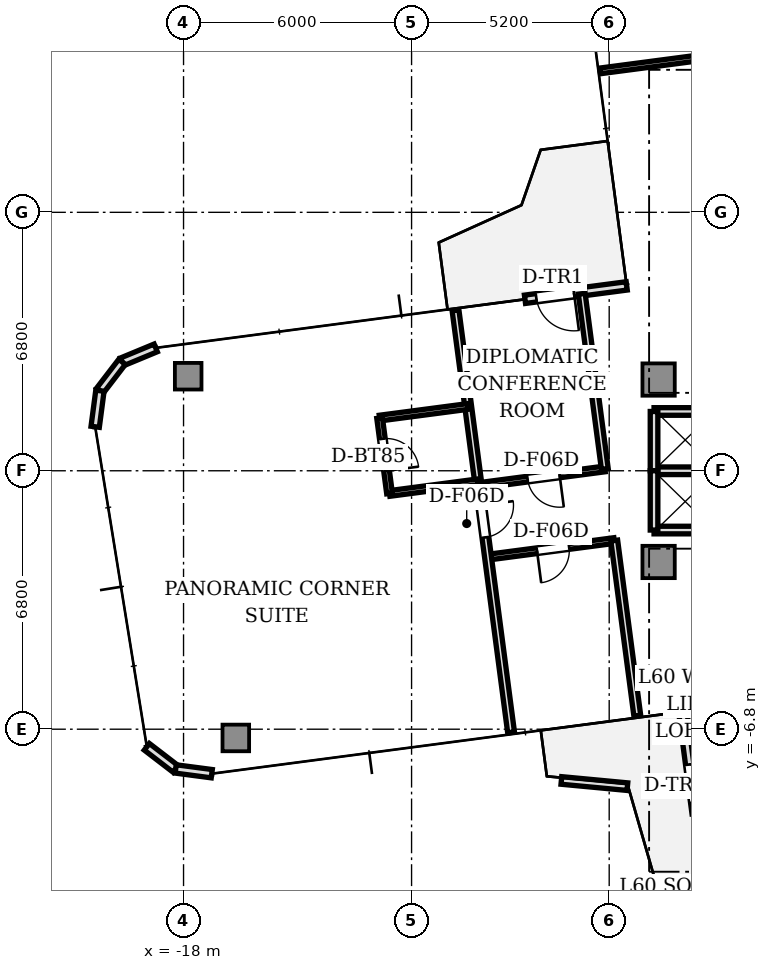
"""IFC4 building model, lengths in metres.
Left out: names, types, materials, properties, quantities, classifications, styles, units other than length and angle.
Written with IfcOpenShell. Run it as: python <this file> out.ifc"""

import sys

from ifc_helpers import new_model, si_unit, direction, frame, frame_2d, origin, origin_2d, place, context, subcontext, project, spatial, rectangle, extrude, source, transform, mapped, element, fill, save


model = new_model("IFC4")
c1 = context("Model", 3, precision=1e-05, world=origin(), true_north=direction((0.0, 1.0)))
c2 = subcontext(c1, "Body", "Model", "MODEL_VIEW")
j1 = project(units=[si_unit("LENGTHUNIT", "METRE"), si_unit("PLANEANGLEUNIT", "RADIAN")], contexts=[c1])
p1 = place(None, origin())
s1 = spatial("IfcSite", under=j1, at=p1, CompositionType="ELEMENT")
p2 = place(p1, origin())
s2 = spatial("IfcBuilding", under=s1, at=p2, CompositionType="ELEMENT")
p3 = place(p2, frame((0.0, 0.0, 216.55)))
s3 = spatial("IfcBuildingStorey", under=s2, at=p3, CompositionType="ELEMENT", Elevation=216.55)
m1 = source(origin(), c2, "Body", "SweptSolid", [
    extrude(rectangle(XDim=0.85, YDim=0.85, at=origin_2d()), origin(), (0.0, 0.0, 1.0), 3.11),
])
for number, where, z_axis, x_axis in (
    (1, (-5.5, 2.4, 0.0), (0.0, 0.0, 1.0), (1.0, 0.0, 0.0)),
    (2, (-5.5, -2.4, 0.0), (0.0, 0.0, 1.0), (1.0, 0.0, 0.0)),
):
    element("IfcColumn", number, at=place(p3, frame(where, z_axis=z_axis, x_axis=x_axis)), inside=s3, PredefinedType="COLUMN", context=c2, shape_type="MappedRepresentation", body=[
        mapped(m1, transform((0.0, 0.0, 0.0), scale=1.0)),
    ])
m2 = source(origin(), c2, "Body", "SweptSolid", [
    extrude(rectangle(XDim=0.7, YDim=0.7, at=origin_2d()), origin(), (0.0, 0.0, 1.0), 3.11),
])
for number, where, z_axis, x_axis in (
    (3, (-17.878, 2.488, 0.0), (0.0, 0.0, 1.0), (1.0, 0.0, 0.0)),
    (4, (-16.625, -7.03, 0.0), (0.0, 0.0, 1.0), (1.0, 0.0, 0.0)),
):
    element("IfcColumn", number, at=place(p3, frame(where, z_axis=z_axis, x_axis=x_axis)), inside=s3, PredefinedType="COLUMN", context=c2, shape_type="MappedRepresentation", body=[
        mapped(m2, transform((0.0, 0.0, 0.0), scale=1.0)),
    ])
p4 = place(p3, frame((-6.339, 4.864, 0.0), z_axis=(0.0, 0.0, 1.0), x_axis=(-0.991439824936, -0.130564442062, 0.0)))
e5 = element("IfcWall", 5, at=p4, inside=s3, PredefinedType="STANDARD", context=c2, shape_type="SweptSolid", body=[
    extrude(rectangle(XDim=2.7, YDim=0.22, at=frame_2d((1.35, 0.0))), origin(), (0.0, 0.0, 1.0), 3.11),
])
p5 = place(p4, frame((1.4, 0.0, 0.0)))
e6 = element("IfcOpeningElement", 6, at=p5, cuts=e5, PredefinedType="OPENING", context=c2, shape_type="SweptSolid", body=[
    extrude(rectangle(XDim=1.0, YDim=2.2, at=frame_2d((0.5, 1.1))), frame((0.0, 0.12, 0.0), z_axis=(0.0, -1.0, 0.0), x_axis=(1.0, 0.0, 0.0)), (0.0, 0.0, 1.0), 0.24),
])
for number, where, z_axis, x_axis in (
    (7, (-18.732, 3.233, 0.0), (0.0, 0.0, 1.0), (-0.924, -0.383, 0.0)),
    (8, (-19.617, 2.866, 0.0), (0.0, 0.0, 1.0), (-0.609, -0.793, 0.0)),
    (9, (-20.2, 2.106, 0.0), (0.0, 0.0, 1.0), (-0.131, -0.991, 0.0)),
):
    element("IfcWall", number, at=place(p3, frame(where, z_axis=z_axis, x_axis=x_axis)), inside=s3, PredefinedType="STANDARD", context=c2, shape_type="SweptSolid", body=[
        extrude(rectangle(XDim=0.958, YDim=0.22, at=frame_2d((0.479, 0.0))), origin(), (0.0, 0.0, 1.0), 3.11),
    ])
p6 = place(p3, frame((-18.966, -7.263, 0.0), z_axis=(0.0, 0.0, 1.0), x_axis=(0.793249178392, -0.608897151398, 0.0)))
e10 = element("IfcWall", 10, at=p6, inside=s3, PredefinedType="STANDARD", context=c2, shape_type="SweptSolid", body=[
    extrude(rectangle(XDim=0.958, YDim=0.22, at=frame_2d((0.479, 0.0))), origin(), (0.0, 0.0, 1.0), 3.11),
])
p7 = place(p3, frame((-18.207, -7.846, 0.0), z_axis=(0.0, 0.0, 1.0), x_axis=(0.991444747987, -0.130527053476, 0.0)))
e11 = element("IfcWall", 11, at=p7, inside=s3, PredefinedType="STANDARD", context=c2, shape_type="SweptSolid", body=[
    extrude(rectangle(XDim=0.958, YDim=0.22, at=frame_2d((0.479, 0.0))), origin(), (0.0, 0.0, 1.0), 3.11),
])
p8 = place(p3, frame((-4.864, -6.339, 0.0), z_axis=(0.0, 0.0, 1.0), x_axis=(0.130564442062, -0.991439824936, 0.0)))
e12 = element("IfcWall", 12, at=p8, inside=s3, PredefinedType="STANDARD", context=c2, shape_type="SweptSolid", body=[
    extrude(rectangle(XDim=2.7, YDim=0.22, at=frame_2d((1.35, 0.0))), origin(), (0.0, 0.0, 1.0), 3.11),
])
p9 = place(p8, frame((1.4, 0.0, 0.0)))
e13 = element("IfcOpeningElement", 13, at=p9, cuts=e12, PredefinedType="OPENING", context=c2, shape_type="SweptSolid", body=[
    extrude(rectangle(XDim=1.0, YDim=2.2, at=frame_2d((0.5, 1.1))), frame((0.0, 0.12, 0.0), z_axis=(0.0, -1.0, 0.0), x_axis=(1.0, 0.0, 0.0)), (0.0, 0.0, 1.0), 0.24),
])
p10 = place(p3, frame((-8.059, -8.148, 0.0), z_axis=(0.0, 0.0, 1.0), x_axis=(0.995612263096, -0.093574684464, 0.0)))
e14 = element("IfcWall", 14, at=p10, inside=s3, PredefinedType="PARAPET", context=c2, shape_type="SweptSolid", body=[
    extrude(rectangle(XDim=1.745, YDim=0.2, at=frame_2d((0.873, 0.0))), origin(), (0.0, 0.0, 1.0), 0.65),
])
for number, where, z_axis, x_axis in (
    (15, (-5.62, 1.56, 0.0), (0.0, 0.0, 1.0), (1.0, 0.0, 0.0)),
    (16, (-5.62, -1.56, 0.0), (0.0, 0.0, 1.0), (1.0, 0.0, 0.0)),
    (17, (-5.62, 0.0, 0.0), (0.0, 0.0, 1.0), (1.0, 0.0, 0.0)),
):
    element("IfcWall", number, at=place(p3, frame(where, z_axis=z_axis, x_axis=x_axis)), inside=s3, PredefinedType="SOLIDWALL", context=c2, shape_type="SweptSolid", body=[
        extrude(rectangle(XDim=1.64, YDim=0.2, at=frame_2d((0.82, 0.0))), origin(), (0.0, 0.0, 1.0), 2.66),
    ])
for number, where, z_axis, x_axis in (
    (18, (-5.62, 0.0, 0.0), (0.0, 0.0, 1.0), (0.0, 1.0, 0.0)),
    (19, (-5.62, -1.56, 0.0), (0.0, 0.0, 1.0), (0.0, 1.0, 0.0)),
):
    element("IfcWall", number, at=place(p3, frame(where, z_axis=z_axis, x_axis=x_axis)), inside=s3, PredefinedType="SOLIDWALL", context=c2, shape_type="SweptSolid", body=[
        extrude(rectangle(XDim=1.56, YDim=0.2, at=frame_2d((0.78, 0.0))), origin(), (0.0, 0.0, 1.0), 2.66),
    ])
p11 = place(p3, frame((4.071, 11.984, 0.0), z_axis=(0.0, 0.0, 1.0), x_axis=(-0.991444721874, -0.130527251821, 0.0)))
e20 = element("IfcWall", 20, at=p11, inside=s3, PredefinedType="PARTITIONING", context=c2, shape_type="SweptSolid", body=[
    extrude(rectangle(XDim=11.2, YDim=0.15, at=frame_2d((5.6, 0.0))), origin(), (0.0, 0.0, 1.0), 2.66),
])
p12 = place(p11, frame((4.8, 0.0, 0.0)))
e21 = element("IfcOpeningElement", 21, at=p12, cuts=e20, PredefinedType="OPENING", context=c2, shape_type="SweptSolid", body=[
    extrude(rectangle(XDim=1.6, YDim=2.25, at=frame_2d((0.8, 1.125))), frame((0.0, 0.085, 0.0), z_axis=(0.0, -1.0, 0.0), x_axis=(1.0, 0.0, 0.0)), (0.0, 0.0, 1.0), 0.17),
])
p13 = place(p3, frame((-6.667, -1.836, 0.0), z_axis=(0.0, 0.0, 1.0), x_axis=(-0.991444866817, -0.130526150873, 0.0)))
e22 = element("IfcWall", 22, at=p13, inside=s3, PredefinedType="PARTITIONING", context=c2, shape_type="SweptSolid", body=[
    extrude(rectangle(XDim=3.35, YDim=0.15, at=frame_2d((1.675, 0.0))), origin(), (0.0, 0.0, 1.0), 2.66),
])
p14 = place(p13, frame((1.2, 0.0, 0.0)))
e23 = element("IfcOpeningElement", 23, at=p14, cuts=e22, PredefinedType="OPENING", context=c2, shape_type="SweptSolid", body=[
    extrude(rectangle(XDim=0.85, YDim=2.1, at=frame_2d((0.425, 1.05))), frame((0.0, 0.085, 0.0), z_axis=(0.0, -1.0, 0.0), x_axis=(1.0, 0.0, 0.0)), (0.0, 0.0, 1.0), 0.17),
])
p15 = place(p3, frame((-6.915, 0.048, 0.0), z_axis=(0.0, 0.0, 1.0), x_axis=(-0.991446108327, -0.130516720324, 0.0)))
e24 = element("IfcWall", 24, at=p15, inside=s3, PredefinedType="PARTITIONING", context=c2, shape_type="SweptSolid", body=[
    extrude(rectangle(XDim=3.35, YDim=0.15, at=frame_2d((1.675, 0.0))), origin(), (0.0, 0.0, 1.0), 2.66),
])
p16 = place(p15, frame((1.2, 0.0, 0.0)))
e25 = element("IfcOpeningElement", 25, at=p16, cuts=e24, PredefinedType="OPENING", context=c2, shape_type="SweptSolid", body=[
    extrude(rectangle(XDim=0.85, YDim=2.1, at=frame_2d((0.425, 1.05))), frame((0.0, 0.085, 0.0), z_axis=(0.0, -1.0, 0.0), x_axis=(1.0, 0.0, 0.0)), (0.0, 0.0, 1.0), 0.17),
])
p17 = place(p3, frame((-6.667, -1.836, 0.0), z_axis=(0.0, 0.0, 1.0), x_axis=(0.13051970184, -0.991445715827, 0.0)))
e26 = element("IfcWall", 26, at=p17, inside=s3, PredefinedType="PARTITIONING", context=c2, shape_type="SweptSolid", body=[
    extrude(rectangle(XDim=4.65, YDim=0.18, at=frame_2d((2.325, 0.0))), origin(), (0.0, 0.0, 1.0), 2.66),
])
p18 = place(p3, frame((-7.522, 4.658, 0.0), z_axis=(0.0, 0.0, 1.0), x_axis=(0.130526496103, -0.991444821367, 0.0)))
e27 = element("IfcWall", 27, at=p18, inside=s3, PredefinedType="PARTITIONING", context=c2, shape_type="SweptSolid", body=[
    extrude(rectangle(XDim=4.65, YDim=0.18, at=frame_2d((2.325, 0.0))), origin(), (0.0, 0.0, 1.0), 2.66),
])
p19 = place(p3, frame((-10.844, 4.221, 0.0), z_axis=(0.0, 0.0, 1.0), x_axis=(0.130527251821, -0.991444721874, 0.0)))
e28 = element("IfcWall", 28, at=p19, inside=s3, PredefinedType="PARTITIONING", context=c2, shape_type="SweptSolid", body=[
    extrude(rectangle(XDim=11.2, YDim=0.18, at=frame_2d((5.6, 0.0))), origin(), (0.0, 0.0, 1.0), 2.66),
])
p20 = place(p19, frame((5.175, 0.0, 0.0)))
e29 = element("IfcOpeningElement", 29, at=p20, cuts=e28, PredefinedType="OPENING", context=c2, shape_type="SweptSolid", body=[
    extrude(rectangle(XDim=0.85, YDim=2.1, at=frame_2d((0.425, 1.05))), frame((0.0, 0.1, 0.0), z_axis=(0.0, -1.0, 0.0), x_axis=(1.0, 0.0, 0.0)), (0.0, 0.0, 1.0), 0.2),
])
p21 = place(p3, frame((-10.25, -0.29, 0.0), z_axis=(0.0, 0.0, 1.0), x_axis=(-0.991436251812, -0.130591571678, 0.0)))
e30 = element("IfcWall", 30, at=p21, inside=s3, PredefinedType="PARTITIONING", context=c2, shape_type="SweptSolid", body=[
    extrude(rectangle(XDim=2.35, YDim=0.15, at=frame_2d((1.175, 0.0))), origin(), (0.0, 0.0, 1.0), 2.66),
])
p22 = place(p3, frame((-10.511, 1.692, 0.0), z_axis=(0.0, 0.0, 1.0), x_axis=(-0.991451466659, -0.130476010281, 0.0)))
e31 = element("IfcWall", 31, at=p22, inside=s3, PredefinedType="PARTITIONING", context=c2, shape_type="SweptSolid", body=[
    extrude(rectangle(XDim=2.35, YDim=0.15, at=frame_2d((1.175, 0.0))), origin(), (0.0, 0.0, 1.0), 2.66),
])
p23 = place(p3, frame((-12.841, 1.386, 0.0), z_axis=(0.0, 0.0, 1.0), x_axis=(0.130612392842, -0.991433509034, 0.0)))
e32 = element("IfcWall", 32, at=p23, inside=s3, PredefinedType="PARTITIONING", context=c2, shape_type="SweptSolid", body=[
    extrude(rectangle(XDim=2.0, YDim=0.15, at=frame_2d((1.0, 0.0))), origin(), (0.0, 0.0, 1.0), 2.66),
])
p24 = place(p23, frame((0.55, 0.0, 0.0)))
e33 = element("IfcOpeningElement", 33, at=p24, cuts=e32, PredefinedType="OPENING", context=c2, shape_type="SweptSolid", body=[
    extrude(rectangle(XDim=0.85, YDim=2.1, at=frame_2d((0.425, 1.05))), frame((0.0, 0.085, 0.0), z_axis=(0.0, -1.0, 0.0), x_axis=(1.0, 0.0, 0.0)), (0.0, 0.0, 1.0), 0.17),
])
m3 = source(origin(), c2, "Body", "SweptSolid", [
    extrude(rectangle(XDim=1.0, YDim=0.05, at=origin_2d()), origin(), (0.0, 0.0, 1.0), 2.2),
])
p25 = place(p5, frame((0.5, 0.0, 0.0)))
e34 = element("IfcDoor", 34, at=p25, inside=s3, OperationType="SINGLE_SWING_LEFT", PredefinedType="DOOR", context=c2, shape_type="MappedRepresentation", body=[
    mapped(m3, transform((0.0, 0.0, 0.0), scale=1.0)),
])
fill(e6, e34)
p26 = place(p9, frame((0.5, 0.0, 0.0)))
e35 = element("IfcDoor", 35, at=p26, inside=s3, OperationType="SINGLE_SWING_LEFT", PredefinedType="DOOR", context=c2, shape_type="MappedRepresentation", body=[
    mapped(m3, transform((0.0, 0.0, 0.0), scale=1.0)),
])
fill(e13, e35)
m4 = source(origin(), c2, "Body", "SweptSolid", [
    extrude(rectangle(XDim=0.85, YDim=0.05, at=origin_2d()), origin(), (0.0, 0.0, 1.0), 2.1),
])
p27 = place(p14, frame((0.425, 0.0, 0.0)))
e36 = element("IfcDoor", 36, at=p27, inside=s3, OperationType="SINGLE_SWING_RIGHT", PredefinedType="DOOR", context=c2, shape_type="MappedRepresentation", body=[
    mapped(m4, transform((0.0, 0.0, 0.0), scale=1.0)),
])
fill(e23, e36)
p28 = place(p16, frame((0.425, 0.0, 0.0)))
e37 = element("IfcDoor", 37, at=p28, inside=s3, OperationType="SINGLE_SWING_LEFT", PredefinedType="DOOR", context=c2, shape_type="MappedRepresentation", body=[
    mapped(m4, transform((0.0, 0.0, 0.0), scale=1.0)),
])
fill(e25, e37)
p29 = place(p24, frame((0.425, 0.0, 0.0)))
e38 = element("IfcDoor", 38, at=p29, inside=s3, OperationType="SINGLE_SWING_RIGHT", PredefinedType="DOOR", context=c2, shape_type="MappedRepresentation", body=[
    mapped(m4, transform((0.0, 0.0, 0.0), scale=1.0)),
])
fill(e33, e38)
p30 = place(p20, frame((0.425, 0.0, 0.0)))
e39 = element("IfcDoor", 39, at=p30, inside=s3, OperationType="SINGLE_SWING_LEFT", PredefinedType="DOOR", context=c2, shape_type="MappedRepresentation", body=[
    mapped(m4, transform((0.0, 0.0, 0.0), scale=1.0)),
])
fill(e29, e39)
save(model, sys.argv[1])
